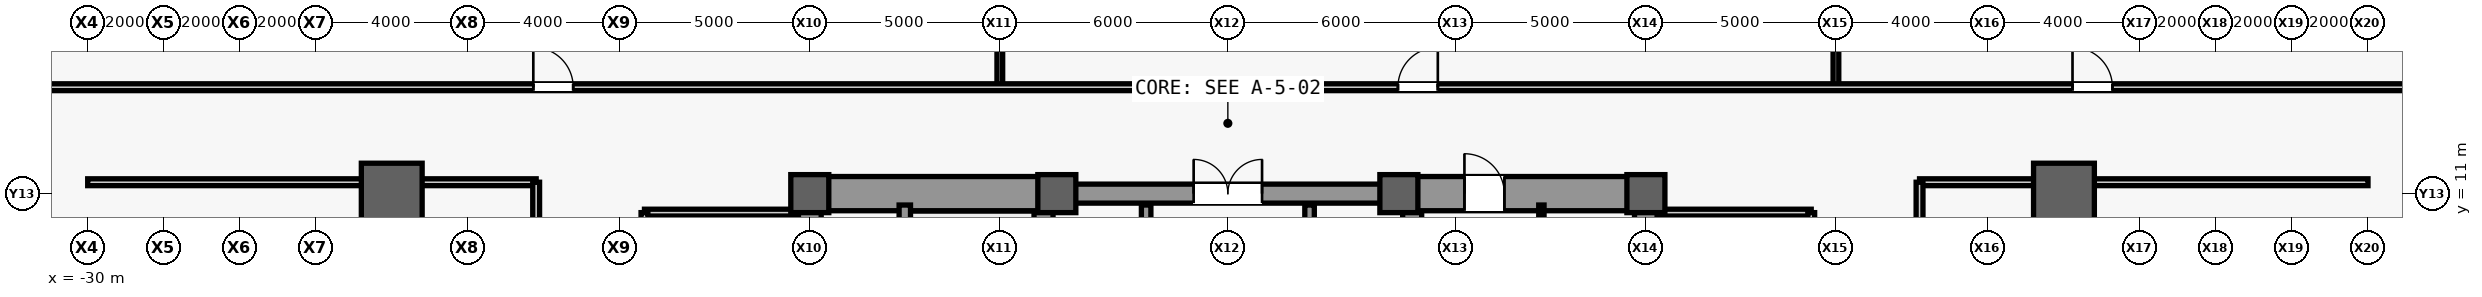
"""IFC4 building model, lengths in metres.
Left out: names, types, materials, properties, quantities, classifications, styles, units other than length and angle.
Written with IfcOpenShell. Run it as: python <this file> out.ifc"""

import sys

from ifc_helpers import new_model, si_unit, direction, frame, frame_2d, origin, origin_2d, place, context, subcontext, project, spatial, rectangle, extrude, source, transform, mapped, element, fill, save


model = new_model("IFC4")
c1 = context("Model", 3, precision=1e-05, world=origin(), true_north=direction((0.0, 1.0)))
c2 = subcontext(c1, "Body", "Model", "MODEL_VIEW")
j1 = project(units=[si_unit("LENGTHUNIT", "METRE"), si_unit("PLANEANGLEUNIT", "RADIAN")], contexts=[c1])
p1 = place(None, origin())
s1 = spatial("IfcSite", under=j1, at=p1, CompositionType="ELEMENT")
p2 = place(p1, origin())
s2 = spatial("IfcBuilding", under=s1, at=p2, CompositionType="ELEMENT")
p3 = place(p2, frame((0.0, 0.0, 17.4)))
s3 = spatial("IfcBuildingStorey", under=s2, at=p3, CompositionType="ELEMENT", Elevation=17.4)
m1 = source(origin(), c2, "Body", "SweptSolid", [
    extrude(rectangle(XDim=22.0, YDim=0.6, at=frame_2d((11.0, 0.0))), origin(), (0.0, 0.0, 1.0), 4.48),
])
p4 = place(p3, frame((-11.0, -11.0, 0.0), z_axis=(0.0, 0.0, 1.0), x_axis=(0.0, 1.0, 0.0)))
e1 = element("IfcWall", 1, at=p4, inside=s3, PredefinedType="SHEAR", context=c2, shape_type="MappedRepresentation", body=[
    mapped(m1, transform((0.0, 0.0, 0.0), scale=1.0)),
])
m2 = source(origin(), c2, "Body", "SweptSolid", [
    extrude(rectangle(XDim=1.1, YDim=2.2, at=frame_2d((0.55, 1.1))), frame((0.0, 0.31, 0.0), z_axis=(0.0, -1.0, 0.0), x_axis=(1.0, 0.0, 0.0)), (0.0, 0.0, 1.0), 0.62),
])
p5 = place(p4, frame((0.8, 0.0, 0.0)))
e2 = element("IfcOpeningElement", 2, at=p5, cuts=e1, PredefinedType="OPENING", context=c2, shape_type="MappedRepresentation", body=[
    mapped(m2, transform((0.0, 0.0, 0.0), scale=1.0)),
])
p6 = place(p4, frame((12.5, 0.0, 0.0)))
e3 = element("IfcOpeningElement", 3, at=p6, cuts=e1, PredefinedType="OPENING", context=c2, shape_type="MappedRepresentation", body=[
    mapped(m2, transform((0.0, 0.0, 0.0), scale=1.0)),
])
m3 = source(origin(), c2, "Body", "SweptSolid", [
    extrude(rectangle(XDim=0.9, YDim=2.15, at=frame_2d((0.45, 1.075))), frame((0.0, 0.31, 0.0), z_axis=(0.0, -1.0, 0.0), x_axis=(1.0, 0.0, 0.0)), (0.0, 0.0, 1.0), 0.62),
])
p7 = place(p4, frame((6.2, 0.0, 0.0)))
e4 = element("IfcOpeningElement", 4, at=p7, cuts=e1, PredefinedType="OPENING", context=c2, shape_type="MappedRepresentation", body=[
    mapped(m3, transform((0.0, 0.0, 0.0), scale=1.0)),
])
p8 = place(p4, frame((8.05, 0.0, 0.0)))
e5 = element("IfcOpeningElement", 5, at=p8, cuts=e1, PredefinedType="OPENING", context=c2, shape_type="MappedRepresentation", body=[
    mapped(m3, transform((0.0, 0.0, 0.0), scale=1.0)),
])
m4 = source(origin(), c2, "Body", "SweptSolid", [
    extrude(rectangle(XDim=1.3, YDim=2.3, at=frame_2d((0.65, 1.15))), frame((0.0, 0.31, 0.0), z_axis=(0.0, -1.0, 0.0), x_axis=(1.0, 0.0, 0.0)), (0.0, 0.0, 1.0), 0.62),
])
p9 = place(p4, frame((2.7, 0.0, 0.0)))
e6 = element("IfcOpeningElement", 6, at=p9, cuts=e1, PredefinedType="OPENING", context=c2, shape_type="MappedRepresentation", body=[
    mapped(m4, transform((0.0, 0.0, 0.0), scale=1.0)),
])
p10 = place(p3, frame((11.0, -11.0, 0.0), z_axis=(0.0, 0.0, 1.0), x_axis=(0.0, 1.0, 0.0)))
e7 = element("IfcWall", 7, at=p10, inside=s3, PredefinedType="SHEAR", context=c2, shape_type="MappedRepresentation", body=[
    mapped(m1, transform((0.0, 0.0, 0.0), scale=1.0)),
])
p11 = place(p10, frame((0.8, 0.0, 0.0)))
e8 = element("IfcOpeningElement", 8, at=p11, cuts=e7, PredefinedType="OPENING", context=c2, shape_type="MappedRepresentation", body=[
    mapped(m2, transform((0.0, 0.0, 0.0), scale=1.0)),
])
p12 = place(p10, frame((6.85, 0.0, 0.0)))
e9 = element("IfcOpeningElement", 9, at=p12, cuts=e7, PredefinedType="OPENING", context=c2, shape_type="MappedRepresentation", body=[
    mapped(m3, transform((0.0, 0.0, 0.0), scale=1.0)),
])
p13 = place(p10, frame((2.7, 0.0, 0.0)))
e10 = element("IfcOpeningElement", 10, at=p13, cuts=e7, PredefinedType="OPENING", context=c2, shape_type="MappedRepresentation", body=[
    mapped(m4, transform((0.0, 0.0, 0.0), scale=1.0)),
])
p14 = place(p10, frame((13.35, 0.0, 0.0)))
e11 = element("IfcOpeningElement", 11, at=p14, cuts=e7, PredefinedType="OPENING", context=c2, shape_type="MappedRepresentation", body=[
    mapped(m4, transform((0.0, 0.0, 0.0), scale=1.0)),
])
m5 = source(origin(), c2, "Body", "SweptSolid", [
    extrude(rectangle(XDim=21.4, YDim=0.5, at=frame_2d((10.7, 0.0))), origin(), (0.0, 0.0, 1.0), 4.48),
])
for number, where, z_axis, x_axis in (
    (12, (-4.85, -10.7, 0.0), (0.0, 0.0, 1.0), (0.0, 1.0, 0.0)),
    (13, (4.85, -10.7, 0.0), (0.0, 0.0, 1.0), (0.0, 1.0, 0.0)),
):
    element("IfcWall", number, at=place(p3, frame(where, z_axis=z_axis, x_axis=x_axis)), inside=s3, PredefinedType="SHEAR", context=c2, shape_type="MappedRepresentation", body=[
        mapped(m5, transform((0.0, 0.0, 0.0), scale=1.0)),
    ])
m6 = source(origin(), c2, "Body", "SweptSolid", [
    extrude(rectangle(XDim=5.85, YDim=0.9, at=frame_2d((2.925, 0.0))), origin(), (0.0, 0.0, 1.0), 4.48),
])
p15 = place(p3, frame((-10.7, 11.0, 0.0), z_axis=(0.0, 0.0, 1.0), x_axis=(1.0, 0.0, 0.0)))
e14 = element("IfcWall", 14, at=p15, inside=s3, PredefinedType="SHEAR", context=c2, shape_type="MappedRepresentation", body=[
    mapped(m6, transform((0.0, 0.0, 0.0), scale=1.0)),
])
p16 = place(p3, frame((4.85, 11.0, 0.0), z_axis=(0.0, 0.0, 1.0), x_axis=(1.0, 0.0, 0.0)))
e15 = element("IfcWall", 15, at=p16, inside=s3, PredefinedType="SHEAR", context=c2, shape_type="MappedRepresentation", body=[
    mapped(m6, transform((0.0, 0.0, 0.0), scale=1.0)),
])
m7 = source(origin(), c2, "Body", "SweptSolid", [
    extrude(rectangle(XDim=1.05, YDim=2.2, at=frame_2d((0.525, 1.1))), frame((0.0, 0.46, 0.0), z_axis=(0.0, -1.0, 0.0), x_axis=(1.0, 0.0, 0.0)), (0.0, 0.0, 1.0), 0.92),
])
p17 = place(p16, frame((1.375, 0.0, 0.0)))
e16 = element("IfcOpeningElement", 16, at=p17, cuts=e15, PredefinedType="OPENING", context=c2, shape_type="MappedRepresentation", body=[
    mapped(m7, transform((0.0, 0.0, 0.0), scale=1.0)),
])
m8 = source(origin(), c2, "Body", "SweptSolid", [
    extrude(rectangle(XDim=9.2, YDim=0.5, at=frame_2d((4.6, 0.0))), origin(), (0.0, 0.0, 1.0), 4.48),
])
p18 = place(p3, frame((-4.6, 11.0, 0.0), z_axis=(0.0, 0.0, 1.0), x_axis=(1.0, 0.0, 0.0)))
e17 = element("IfcWall", 17, at=p18, inside=s3, PredefinedType="SHEAR", context=c2, shape_type="MappedRepresentation", body=[
    mapped(m8, transform((0.0, 0.0, 0.0), scale=1.0)),
])
m9 = source(origin(), c2, "Body", "SweptSolid", [
    extrude(rectangle(XDim=1.8, YDim=2.25, at=frame_2d((0.9, 1.125))), frame((0.0, 0.26, 0.0), z_axis=(0.0, -1.0, 0.0), x_axis=(1.0, 0.0, 0.0)), (0.0, 0.0, 1.0), 0.52),
])
p19 = place(p18, frame((3.7, 0.0, 0.0)))
e18 = element("IfcOpeningElement", 18, at=p19, cuts=e17, PredefinedType="OPENING", context=c2, shape_type="MappedRepresentation", body=[
    mapped(m9, transform((0.0, 0.0, 0.0), scale=1.0)),
])
m10 = source(origin(), c2, "Body", "SweptSolid", [
    extrude(rectangle(XDim=1.6, YDim=1.6, at=origin_2d()), origin(), (0.0, 0.0, 1.0), 4.8),
])
p20 = place(p3, frame((-22.0, 11.0, 0.0), z_axis=(0.0, 0.0, 1.0), x_axis=(1.0, 0.0, 0.0)))
e19 = element("IfcColumn", 19, at=p20, inside=s3, PredefinedType="COLUMN", context=c2, shape_type="MappedRepresentation", body=[
    mapped(m10, transform((0.0, 0.0, 0.0), scale=1.0)),
])
m11 = source(origin(), c2, "Body", "SweptSolid", [
    extrude(rectangle(XDim=1.0, YDim=1.0, at=origin_2d()), origin(), (0.0, 0.0, 1.0), 4.8),
])
for number, where, z_axis, x_axis in (
    (20, (-11.0, 11.0, 0.0), (0.0, 0.0, 1.0), (1.0, 0.0, 0.0)),
    (21, (-4.5, 11.0, 0.0), (0.0, 0.0, 1.0), (1.0, 0.0, 0.0)),
    (22, (4.5, 11.0, 0.0), (0.0, 0.0, 1.0), (1.0, 0.0, 0.0)),
    (23, (11.0, 11.0, 0.0), (0.0, 0.0, 1.0), (1.0, 0.0, 0.0)),
):
    element("IfcColumn", number, at=place(p3, frame(where, z_axis=z_axis, x_axis=x_axis)), inside=s3, PredefinedType="COLUMN", context=c2, shape_type="MappedRepresentation", body=[
        mapped(m11, transform((0.0, 0.0, 0.0), scale=1.0)),
    ])
p21 = place(p3, frame((22.0, 11.0, 0.0), z_axis=(0.0, 0.0, 1.0), x_axis=(1.0, 0.0, 0.0)))
e24 = element("IfcColumn", 24, at=p21, inside=s3, PredefinedType="COLUMN", context=c2, shape_type="MappedRepresentation", body=[
    mapped(m10, transform((0.0, 0.0, 0.0), scale=1.0)),
])
m12 = source(origin(), c2, "Body", "SweptSolid", [
    extrude(rectangle(XDim=7.75, YDim=0.3, at=frame_2d((3.875, 0.0))), origin(), (0.0, 0.0, 1.0), 4.48),
])
p22 = place(p3, frame((-8.5, 2.95, 0.0), z_axis=(0.0, 0.0, 1.0), x_axis=(0.0, 1.0, 0.0)))
e25 = element("IfcWall", 25, at=p22, inside=s3, PredefinedType="SHEAR", context=c2, shape_type="MappedRepresentation", body=[
    mapped(m12, transform((0.0, 0.0, 0.0), scale=1.0)),
])
m13 = source(origin(), c2, "Body", "SweptSolid", [
    extrude(rectangle(XDim=9.4, YDim=0.14, at=frame_2d((4.7, 0.0))), origin(), (0.0, 0.0, 1.0), 4.48),
])
p23 = place(p3, frame((8.25, 1.3, 0.0), z_axis=(0.0, 0.0, 1.0), x_axis=(0.0, 1.0, 0.0)))
e26 = element("IfcWall", 26, at=p23, inside=s3, PredefinedType="PARTITIONING", context=c2, shape_type="MappedRepresentation", body=[
    mapped(m13, transform((0.0, 0.0, 0.0), scale=1.0)),
])
m14 = source(origin(), c2, "Body", "SweptSolid", [
    extrude(rectangle(XDim=4.05, YDim=0.18, at=frame_2d((2.025, 0.0))), origin(), (0.0, 0.0, 1.0), 4.48),
])
p24 = place(p3, frame((-15.35, 10.5, 0.0), z_axis=(0.0, 0.0, 1.0), x_axis=(1.0, 0.0, 0.0)))
e27 = element("IfcWall", 27, at=p24, inside=s3, PredefinedType="PARTITIONING", context=c2, shape_type="MappedRepresentation", body=[
    mapped(m14, transform((0.0, 0.0, 0.0), scale=1.0)),
])
m15 = source(origin(), c2, "Body", "SweptSolid", [
    extrude(rectangle(XDim=16.6, YDim=0.18, at=frame_2d((8.3, 0.0))), origin(), (0.0, 0.0, 1.0), 4.48),
])
p25 = place(p3, frame((-15.35, -6.1, 0.0), z_axis=(0.0, 0.0, 1.0), x_axis=(0.0, 1.0, 0.0)))
e28 = element("IfcWall", 28, at=p25, inside=s3, PredefinedType="PARTITIONING", context=c2, shape_type="MappedRepresentation", body=[
    mapped(m15, transform((0.0, 0.0, 0.0), scale=1.0)),
])
m16 = source(origin(), c2, "Body", "SweptSolid", [
    extrude(rectangle(XDim=1.8, YDim=2.25, at=frame_2d((0.9, 1.125))), frame((0.0, 0.1, 0.0), z_axis=(0.0, -1.0, 0.0), x_axis=(1.0, 0.0, 0.0)), (0.0, 0.0, 1.0), 0.2),
])
p26 = place(p25, frame((2.7, 0.0, 0.0)))
e29 = element("IfcOpeningElement", 29, at=p26, cuts=e28, PredefinedType="OPENING", context=c2, shape_type="MappedRepresentation", body=[
    mapped(m16, transform((0.0, 0.0, 0.0), scale=1.0)),
])
p27 = place(p25, frame((11.0, 0.0, 0.0)))
e30 = element("IfcOpeningElement", 30, at=p27, cuts=e28, PredefinedType="OPENING", context=c2, shape_type="MappedRepresentation", body=[
    mapped(m16, transform((0.0, 0.0, 0.0), scale=1.0)),
])
p28 = place(p3, frame((11.3, 10.5, 0.0), z_axis=(0.0, 0.0, 1.0), x_axis=(1.0, 0.0, 0.0)))
e31 = element("IfcWall", 31, at=p28, inside=s3, PredefinedType="PARTITIONING", context=c2, shape_type="MappedRepresentation", body=[
    mapped(m14, transform((0.0, 0.0, 0.0), scale=1.0)),
])
p29 = place(p3, frame((15.35, -6.1, 0.0), z_axis=(0.0, 0.0, 1.0), x_axis=(0.0, 1.0, 0.0)))
e32 = element("IfcWall", 32, at=p29, inside=s3, PredefinedType="PARTITIONING", context=c2, shape_type="MappedRepresentation", body=[
    mapped(m15, transform((0.0, 0.0, 0.0), scale=1.0)),
])
p30 = place(p29, frame((2.7, 0.0, 0.0)))
e33 = element("IfcOpeningElement", 33, at=p30, cuts=e32, PredefinedType="OPENING", context=c2, shape_type="MappedRepresentation", body=[
    mapped(m16, transform((0.0, 0.0, 0.0), scale=1.0)),
])
p31 = place(p29, frame((13.0, 0.0, 0.0)))
e34 = element("IfcOpeningElement", 34, at=p31, cuts=e32, PredefinedType="OPENING", context=c2, shape_type="MappedRepresentation", body=[
    mapped(m16, transform((0.0, 0.0, 0.0), scale=1.0)),
])
m17 = source(origin(), c2, "Body", "SweptSolid", [
    extrude(rectangle(XDim=5.4, YDim=0.25, at=frame_2d((2.7, 0.0))), origin(), (0.0, 0.0, 1.0), 4.48),
])
for number, where, z_axis, x_axis in (
    (35, (-2.15, 5.3, 0.0), (0.0, 0.0, 1.0), (0.0, 1.0, 0.0)),
    (36, (2.15, 5.3, 0.0), (0.0, 0.0, 1.0), (0.0, 1.0, 0.0)),
):
    element("IfcWall", number, at=place(p3, frame(where, z_axis=z_axis, x_axis=x_axis)), inside=s3, PredefinedType="SHEAR", context=c2, shape_type="MappedRepresentation", body=[
        mapped(m17, transform((0.0, 0.0, 0.0), scale=1.0)),
    ])
m18 = source(origin(), c2, "Body", "SweptSolid", [
    extrude(rectangle(XDim=21.2, YDim=0.15, at=frame_2d((10.6, 0.0))), origin(), (0.0, 0.0, 1.0), 4.48),
])
for number, where, z_axis, x_axis in (
    (37, (-6.0, 13.8, 0.0), (0.0, 0.0, 1.0), (0.0, 1.0, 0.0)),
    (38, (16.0, 13.8, 0.0), (0.0, 0.0, 1.0), (0.0, 1.0, 0.0)),
):
    element("IfcWall", number, at=place(p3, frame(where, z_axis=z_axis, x_axis=x_axis)), inside=s3, PredefinedType="PARTITIONING", context=c2, shape_type="MappedRepresentation", body=[
        mapped(m18, transform((0.0, 0.0, 0.0), scale=1.0)),
    ])
m19 = source(origin(), c2, "Body", "SweptSolid", [
    extrude(rectangle(XDim=80.0, YDim=0.18, at=frame_2d((40.0, 0.0))), origin(), (0.0, 0.0, 1.0), 4.48),
])
p32 = place(p3, frame((-40.0, 13.8, 0.0), z_axis=(0.0, 0.0, 1.0), x_axis=(1.0, 0.0, 0.0)))
e39 = element("IfcWall", 39, at=p32, inside=s3, PredefinedType="PARTITIONING", context=c2, shape_type="MappedRepresentation", body=[
    mapped(m19, transform((0.0, 0.0, 0.0), scale=1.0)),
])
m20 = source(origin(), c2, "Body", "SweptSolid", [
    extrude(rectangle(XDim=1.05, YDim=2.2, at=frame_2d((0.525, 1.1))), frame((0.0, 0.1, 0.0), z_axis=(0.0, -1.0, 0.0), x_axis=(1.0, 0.0, 0.0)), (0.0, 0.0, 1.0), 0.2),
])
p33 = place(p32, frame((21.725, 0.0, 0.0)))
e40 = element("IfcOpeningElement", 40, at=p33, cuts=e39, PredefinedType="OPENING", context=c2, shape_type="MappedRepresentation", body=[
    mapped(m20, transform((0.0, 0.0, 0.0), scale=1.0)),
])
p34 = place(p32, frame((44.475, 0.0, 0.0)))
e41 = element("IfcOpeningElement", 41, at=p34, cuts=e39, PredefinedType="OPENING", context=c2, shape_type="MappedRepresentation", body=[
    mapped(m20, transform((0.0, 0.0, 0.0), scale=1.0)),
])
p35 = place(p32, frame((62.225, 0.0, 0.0)))
e42 = element("IfcOpeningElement", 42, at=p35, cuts=e39, PredefinedType="OPENING", context=c2, shape_type="MappedRepresentation", body=[
    mapped(m20, transform((0.0, 0.0, 0.0), scale=1.0)),
])
m21 = source(origin(), c2, "Body", "SweptSolid", [
    extrude(rectangle(XDim=11.8, YDim=0.18, at=frame_2d((5.9, 0.0))), origin(), (0.0, 0.0, 1.0), 2.68),
])
for number, where, z_axis, x_axis in (
    (43, (-30.0, 11.3, 0.0), (0.0, 0.0, 1.0), (1.0, 0.0, 0.0)),
    (44, (18.2, 11.3, 0.0), (0.0, 0.0, 1.0), (1.0, 0.0, 0.0)),
):
    element("IfcWall", number, at=place(p3, frame(where, z_axis=z_axis, x_axis=x_axis)), inside=s3, PredefinedType="PARTITIONING", context=c2, shape_type="MappedRepresentation", body=[
        mapped(m21, transform((0.0, 0.0, 0.0), scale=1.0)),
    ])
m22 = source(origin(), c2, "Body", "SweptSolid", [
    extrude(rectangle(XDim=24.3, YDim=0.18, at=frame_2d((12.15, 0.0))), origin(), (0.0, 0.0, 1.0), 4.48),
])
p36 = place(p3, frame((-18.2, -13.0, 0.0), z_axis=(0.0, 0.0, 1.0), x_axis=(0.0, 1.0, 0.0)))
e45 = element("IfcWall", 45, at=p36, inside=s3, PredefinedType="PARTITIONING", context=c2, shape_type="MappedRepresentation", body=[
    mapped(m22, transform((0.0, 0.0, 0.0), scale=1.0)),
])
m23 = source(origin(), c2, "Body", "SweptSolid", [
    extrude(rectangle(XDim=0.95, YDim=2.15, at=frame_2d((0.475, 1.075))), frame((0.0, 0.1, 0.0), z_axis=(0.0, -1.0, 0.0), x_axis=(1.0, 0.0, 0.0)), (0.0, 0.0, 1.0), 0.2),
])
p37 = place(p36, frame((6.025, 0.0, 0.0)))
e46 = element("IfcOpeningElement", 46, at=p37, cuts=e45, PredefinedType="OPENING", context=c2, shape_type="MappedRepresentation", body=[
    mapped(m23, transform((0.0, 0.0, 0.0), scale=1.0)),
])
p38 = place(p36, frame((18.175, 0.0, 0.0)))
e47 = element("IfcOpeningElement", 47, at=p38, cuts=e45, PredefinedType="OPENING", context=c2, shape_type="MappedRepresentation", body=[
    mapped(m23, transform((0.0, 0.0, 0.0), scale=1.0)),
])
p39 = place(p3, frame((18.2, -13.0, 0.0), z_axis=(0.0, 0.0, 1.0), x_axis=(0.0, 1.0, 0.0)))
e48 = element("IfcWall", 48, at=p39, inside=s3, PredefinedType="PARTITIONING", context=c2, shape_type="MappedRepresentation", body=[
    mapped(m22, transform((0.0, 0.0, 0.0), scale=1.0)),
])
p40 = place(p39, frame((6.025, 0.0, 0.0)))
e49 = element("IfcOpeningElement", 49, at=p40, cuts=e48, PredefinedType="OPENING", context=c2, shape_type="MappedRepresentation", body=[
    mapped(m23, transform((0.0, 0.0, 0.0), scale=1.0)),
])
p41 = place(p39, frame((18.175, 0.0, 0.0)))
e50 = element("IfcOpeningElement", 50, at=p41, cuts=e48, PredefinedType="OPENING", context=c2, shape_type="MappedRepresentation", body=[
    mapped(m23, transform((0.0, 0.0, 0.0), scale=1.0)),
])
m24 = source(origin(), c2, "Body", "SweptSolid", [
    extrude(rectangle(XDim=1.05, YDim=2.2, at=frame_2d((0.525, 1.1))), frame((0.0, 0.025, 0.0), z_axis=(0.0, -1.0, 0.0), x_axis=(1.0, 0.0, 0.0)), (0.0, 0.0, 1.0), 0.05),
])
p42 = place(p17, origin())
e51 = element("IfcDoor", 51, at=p42, inside=s3, OperationType="SINGLE_SWING_LEFT", PredefinedType="DOOR", context=c2, shape_type="MappedRepresentation", body=[
    mapped(m24, transform((0.0, 0.0, 0.0), scale=1.0)),
])
fill(e16, e51)
m25 = source(origin(), c2, "Body", "SweptSolid", [
    extrude(rectangle(XDim=1.8, YDim=2.25, at=frame_2d((0.9, 1.125))), frame((0.0, 0.025, 0.0), z_axis=(0.0, -1.0, 0.0), x_axis=(1.0, 0.0, 0.0)), (0.0, 0.0, 1.0), 0.05),
])
p43 = place(p19, origin())
e52 = element("IfcDoor", 52, at=p43, inside=s3, OperationType="SINGLE_SWING_RIGHT", PredefinedType="DOOR", context=c2, shape_type="MappedRepresentation", body=[
    mapped(m25, transform((0.0, 0.0, 0.0), scale=1.0)),
])
fill(e18, e52)
p44 = place(p33, origin())
e53 = element("IfcDoor", 53, at=p44, inside=s3, OperationType="SINGLE_SWING_LEFT", PredefinedType="DOOR", context=c2, shape_type="MappedRepresentation", body=[
    mapped(m24, transform((0.0, 0.0, 0.0), scale=1.0)),
])
fill(e40, e53)
p45 = place(p34, origin())
e54 = element("IfcDoor", 54, at=p45, inside=s3, OperationType="SINGLE_SWING_RIGHT", PredefinedType="DOOR", context=c2, shape_type="MappedRepresentation", body=[
    mapped(m24, transform((0.0, 0.0, 0.0), scale=1.0)),
])
fill(e41, e54)
p46 = place(p35, origin())
e55 = element("IfcDoor", 55, at=p46, inside=s3, OperationType="SINGLE_SWING_LEFT", PredefinedType="DOOR", context=c2, shape_type="MappedRepresentation", body=[
    mapped(m24, transform((0.0, 0.0, 0.0), scale=1.0)),
])
fill(e42, e55)
save(model, sys.argv[1])
